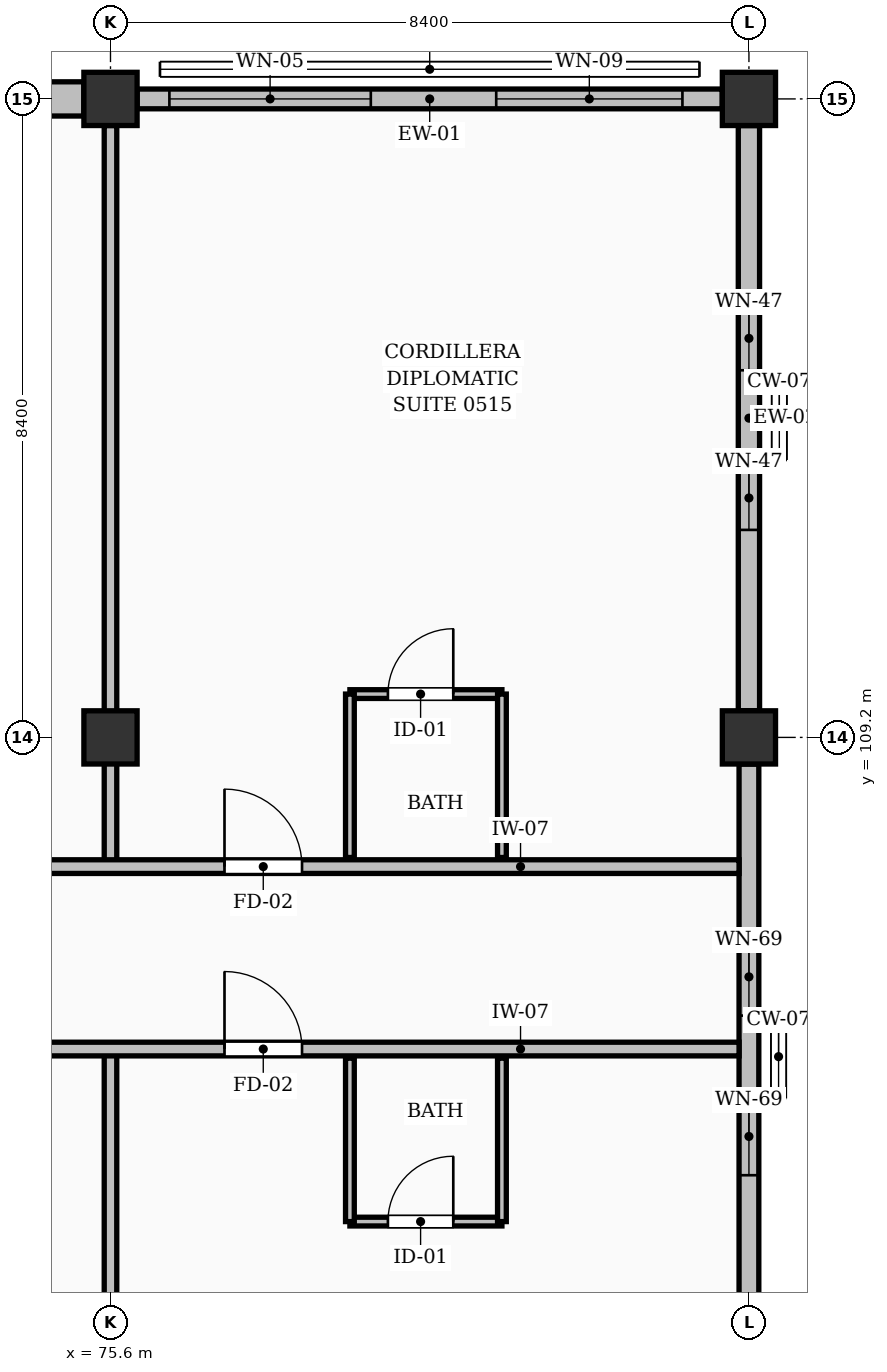
"""IFC4 building model, lengths in metres.
Left out: names, types, materials, properties, quantities, classifications, styles, units other than length and angle.
Written with IfcOpenShell. Run it as: python <this file> out.ifc"""

import sys

from ifc_helpers import new_model, si_unit, direction, frame, frame_2d, origin, origin_2d, place, context, subcontext, project, spatial, rectangle, extrude, element, fill, save


model = new_model("IFC4")
c1 = context("Model", 3, precision=1e-05, world=origin(), true_north=direction((0.0, 1.0)))
c2 = subcontext(c1, "Body", "Model", "MODEL_VIEW")
j1 = project(units=[si_unit("LENGTHUNIT", "METRE"), si_unit("PLANEANGLEUNIT", "RADIAN")], contexts=[c1])
p1 = place(None, origin())
s1 = spatial("IfcSite", under=j1, at=p1, CompositionType="ELEMENT")
p2 = place(p1, origin())
s2 = spatial("IfcBuilding", under=s1, at=p2, CompositionType="ELEMENT")
p3 = place(p2, frame((0.0, 0.0, 18.48)))
s3 = spatial("IfcBuildingStorey", under=s2, at=p3, CompositionType="ELEMENT", Elevation=18.48)
for number, where, z_axis, x_axis in (
    (1, (75.6, 109.2, 0.0), (0.0, 0.0, 1.0), (1.0, 0.0, 0.0)),
    (2, (75.6, 117.6, 0.0), (0.0, 0.0, 1.0), (1.0, 0.0, 0.0)),
    (3, (84.0, 109.2, 0.0), (0.0, 0.0, 1.0), (1.0, 0.0, 0.0)),
    (4, (84.0, 117.6, 0.0), (0.0, 0.0, 1.0), (1.0, 0.0, 0.0)),
):
    element("IfcColumn", number, at=place(p3, frame(where, z_axis=z_axis, x_axis=x_axis)), inside=s3, PredefinedType="COLUMN", context=c2, shape_type="SweptSolid", body=[
        extrude(rectangle(XDim=0.7, YDim=0.7, at=origin_2d()), origin(), (0.0, 0.0, 1.0), 3.36),
    ])
p4 = place(p3, frame((67.551, 117.6, 0.0), z_axis=(0.0, 0.0, 1.0), x_axis=(1.0, 0.0, 0.0)))
e5 = element("IfcWall", 5, at=p4, inside=s3, PredefinedType="SOLIDWALL", context=c2, shape_type="SweptSolid", body=[
    extrude(rectangle(XDim=7.698, YDim=0.45, at=frame_2d((3.849, 0.0))), origin(), (0.0, 0.0, 1.0), 2.414),
])
p5 = place(p4, frame((0.924, 0.0, 0.0)))
e6 = element("IfcOpeningElement", 6, at=p5, cuts=e5, PredefinedType="OPENING", context=c2, shape_type="SweptSolid", body=[
    extrude(rectangle(XDim=1.75, YDim=2.08, at=frame_2d((0.875, 1.04))), frame((0.0, 0.235, 0.0), z_axis=(0.0, -1.0, 0.0), x_axis=(1.0, 0.0, 0.0)), (0.0, 0.0, 1.0), 0.47),
])
p6 = place(p4, frame((4.689, 0.0, 0.25)))
e7 = element("IfcOpeningElement", 7, at=p6, cuts=e5, PredefinedType="OPENING", context=c2, shape_type="SweptSolid", body=[
    extrude(rectangle(XDim=2.22, YDim=1.9, at=frame_2d((1.11, 0.95))), frame((0.0, 0.235, 0.0), z_axis=(0.0, -1.0, 0.0), x_axis=(1.0, 0.0, 0.0)), (0.0, 0.0, 1.0), 0.47),
])
p7 = place(p3, frame((75.951, 117.6, 0.0), z_axis=(0.0, 0.0, 1.0), x_axis=(1.0, 0.0, 0.0)))
e8 = element("IfcWall", 8, at=p7, inside=s3, PredefinedType="SOLIDWALL", context=c2, shape_type="SweptSolid", body=[
    extrude(rectangle(XDim=7.698, YDim=0.26, at=frame_2d((3.849, 0.0))), origin(), (0.0, 0.0, 1.0), 2.414),
])
p8 = place(p7, frame((0.424, 0.0, 0.25)))
e9 = element("IfcOpeningElement", 9, at=p8, cuts=e8, PredefinedType="OPENING", context=c2, shape_type="SweptSolid", body=[
    extrude(rectangle(XDim=2.65, YDim=1.85, at=frame_2d((1.325, 0.925))), frame((0.0, 0.14, 0.0), z_axis=(0.0, -1.0, 0.0), x_axis=(1.0, 0.0, 0.0)), (0.0, 0.0, 1.0), 0.28),
])
p9 = place(p7, frame((4.724, 0.0, 0.25)))
e10 = element("IfcOpeningElement", 10, at=p9, cuts=e8, PredefinedType="OPENING", context=c2, shape_type="SweptSolid", body=[
    extrude(rectangle(XDim=2.45, YDim=1.95, at=frame_2d((1.225, 0.975))), frame((0.0, 0.14, 0.0), z_axis=(0.0, -1.0, 0.0), x_axis=(1.0, 0.0, 0.0)), (0.0, 0.0, 1.0), 0.28),
])
p10 = place(p3, frame((84.0, 101.151, 0.0), z_axis=(0.0, 0.0, 1.0), x_axis=(0.0, 1.0, 0.0)))
e11 = element("IfcWall", 11, at=p10, inside=s3, PredefinedType="SOLIDWALL", context=c2, shape_type="SweptSolid", body=[
    extrude(rectangle(XDim=7.698, YDim=0.26, at=frame_2d((3.849, 0.0))), origin(), (0.0, 0.0, 1.0), 2.414),
])
p11 = place(p10, frame((2.289, 0.0, 0.3)))
e12 = element("IfcOpeningElement", 12, at=p11, cuts=e11, PredefinedType="OPENING", context=c2, shape_type="SweptSolid", body=[
    extrude(rectangle(XDim=1.02, YDim=1.9, at=frame_2d((0.51, 0.95))), frame((0.0, 0.14, 0.0), z_axis=(0.0, -1.0, 0.0), x_axis=(1.0, 0.0, 0.0)), (0.0, 0.0, 1.0), 0.28),
])
p12 = place(p10, frame((4.389, 0.0, 0.3)))
e13 = element("IfcOpeningElement", 13, at=p12, cuts=e11, PredefinedType="OPENING", context=c2, shape_type="SweptSolid", body=[
    extrude(rectangle(XDim=1.02, YDim=1.9, at=frame_2d((0.51, 0.95))), frame((0.0, 0.14, 0.0), z_axis=(0.0, -1.0, 0.0), x_axis=(1.0, 0.0, 0.0)), (0.0, 0.0, 1.0), 0.28),
])
p13 = place(p3, frame((84.0, 109.551, 0.0), z_axis=(0.0, 0.0, 1.0), x_axis=(0.0, 1.0, 0.0)))
e14 = element("IfcWall", 14, at=p13, inside=s3, PredefinedType="SOLIDWALL", context=c2, shape_type="SweptSolid", body=[
    extrude(rectangle(XDim=7.698, YDim=0.28, at=frame_2d((3.849, 0.0))), origin(), (0.0, 0.0, 1.0), 2.414),
])
p14 = place(p13, frame((2.379, 0.0, 0.3)))
e15 = element("IfcOpeningElement", 15, at=p14, cuts=e14, PredefinedType="OPENING", context=c2, shape_type="SweptSolid", body=[
    extrude(rectangle(XDim=0.84, YDim=1.85, at=frame_2d((0.42, 0.925))), frame((0.0, 0.15, 0.0), z_axis=(0.0, -1.0, 0.0), x_axis=(1.0, 0.0, 0.0)), (0.0, 0.0, 1.0), 0.3),
])
p15 = place(p13, frame((4.479, 0.0, 0.3)))
e16 = element("IfcOpeningElement", 16, at=p15, cuts=e14, PredefinedType="OPENING", context=c2, shape_type="SweptSolid", body=[
    extrude(rectangle(XDim=0.84, YDim=1.85, at=frame_2d((0.42, 0.925))), frame((0.0, 0.15, 0.0), z_axis=(0.0, -1.0, 0.0), x_axis=(1.0, 0.0, 0.0)), (0.0, 0.0, 1.0), 0.3),
])
p16 = place(p3, frame((78.75, 109.77, 0.0), z_axis=(0.0, 0.0, 1.0), x_axis=(1.0, 0.0, 0.0)))
e17 = element("IfcWall", 17, at=p16, inside=s3, PredefinedType="PARTITIONING", context=c2, shape_type="SweptSolid", body=[
    extrude(rectangle(XDim=2.0, YDim=0.115, at=frame_2d((1.0, 0.0))), origin(), (0.0, 0.0, 1.0), 3.12),
])
p17 = place(p16, frame((0.5, 0.0, 0.0)))
e18 = element("IfcOpeningElement", 18, at=p17, cuts=e17, PredefinedType="OPENING", context=c2, shape_type="SweptSolid", body=[
    extrude(rectangle(XDim=0.86, YDim=2.05, at=frame_2d((0.43, 1.025))), frame((0.0, 0.067, 0.0), z_axis=(0.0, -1.0, 0.0), x_axis=(1.0, 0.0, 0.0)), (0.0, 0.0, 1.0), 0.135),
])
for number, where, z_axis, x_axis in (
    (19, (78.75, 107.62, 0.0), (0.0, 0.0, 1.0), (0.0, 1.0, 0.0)),
    (20, (80.75, 107.62, 0.0), (0.0, 0.0, 1.0), (0.0, 1.0, 0.0)),
):
    element("IfcWall", number, at=place(p3, frame(where, z_axis=z_axis, x_axis=x_axis)), inside=s3, PredefinedType="PARTITIONING", context=c2, shape_type="SweptSolid", body=[
        extrude(rectangle(XDim=2.15, YDim=0.115, at=frame_2d((1.075, 0.0))), origin(), (0.0, 0.0, 1.0), 3.12),
    ])
p18 = place(p3, frame((75.6, 107.5, 0.0), z_axis=(0.0, 0.0, 1.0), x_axis=(0.0, 1.0, 0.0)))
e21 = element("IfcWall", 21, at=p18, inside=s3, PredefinedType="PARTITIONING", context=c2, shape_type="SweptSolid", body=[
    extrude(rectangle(XDim=9.75, YDim=0.165, at=frame_2d((4.875, 0.0))), origin(), (0.0, 0.0, 1.0), 2.375),
])
p19 = place(p3, frame((40.66, 107.5, 0.0), z_axis=(0.0, 0.0, 1.0), x_axis=(1.0, 0.0, 0.0)))
e22 = element("IfcWall", 22, at=p19, inside=s3, PredefinedType="PARTITIONING", context=c2, shape_type="SweptSolid", body=[
    extrude(rectangle(XDim=43.21, YDim=0.18, at=frame_2d((21.605, 0.0))), origin(), (0.0, 0.0, 1.0), 3.12),
])
p20 = place(p19, frame((0.2, 0.0, 0.0)))
e23 = element("IfcOpeningElement", 23, at=p20, cuts=e22, PredefinedType="OPENING", context=c2, shape_type="SweptSolid", body=[
    extrude(rectangle(XDim=0.94, YDim=2.1, at=frame_2d((0.47, 1.05))), frame((0.0, 0.1, 0.0), z_axis=(0.0, -1.0, 0.0), x_axis=(1.0, 0.0, 0.0)), (0.0, 0.0, 1.0), 0.2),
])
p21 = place(p19, frame((2.71, 0.0, 0.0)))
e24 = element("IfcOpeningElement", 24, at=p21, cuts=e22, PredefinedType="OPENING", context=c2, shape_type="SweptSolid", body=[
    extrude(rectangle(XDim=0.96, YDim=2.15, at=frame_2d((0.48, 1.075))), frame((0.0, 0.1, 0.0), z_axis=(0.0, -1.0, 0.0), x_axis=(1.0, 0.0, 0.0)), (0.0, 0.0, 1.0), 0.2),
])
p22 = place(p19, frame((7.37, 0.0, 0.0)))
e25 = element("IfcOpeningElement", 25, at=p22, cuts=e22, PredefinedType="OPENING", context=c2, shape_type="SweptSolid", body=[
    extrude(rectangle(XDim=0.96, YDim=2.15, at=frame_2d((0.48, 1.075))), frame((0.0, 0.1, 0.0), z_axis=(0.0, -1.0, 0.0), x_axis=(1.0, 0.0, 0.0)), (0.0, 0.0, 1.0), 0.2),
])
p23 = place(p19, frame((11.11, 0.0, 0.0)))
e26 = element("IfcOpeningElement", 26, at=p23, cuts=e22, PredefinedType="OPENING", context=c2, shape_type="SweptSolid", body=[
    extrude(rectangle(XDim=0.96, YDim=2.15, at=frame_2d((0.48, 1.075))), frame((0.0, 0.1, 0.0), z_axis=(0.0, -1.0, 0.0), x_axis=(1.0, 0.0, 0.0)), (0.0, 0.0, 1.0), 0.2),
])
p24 = place(p19, frame((15.77, 0.0, 0.0)))
e27 = element("IfcOpeningElement", 27, at=p24, cuts=e22, PredefinedType="OPENING", context=c2, shape_type="SweptSolid", body=[
    extrude(rectangle(XDim=0.96, YDim=2.15, at=frame_2d((0.48, 1.075))), frame((0.0, 0.1, 0.0), z_axis=(0.0, -1.0, 0.0), x_axis=(1.0, 0.0, 0.0)), (0.0, 0.0, 1.0), 0.2),
])
p25 = place(p19, frame((19.51, 0.0, 0.0)))
e28 = element("IfcOpeningElement", 28, at=p25, cuts=e22, PredefinedType="OPENING", context=c2, shape_type="SweptSolid", body=[
    extrude(rectangle(XDim=0.96, YDim=2.15, at=frame_2d((0.48, 1.075))), frame((0.0, 0.1, 0.0), z_axis=(0.0, -1.0, 0.0), x_axis=(1.0, 0.0, 0.0)), (0.0, 0.0, 1.0), 0.2),
])
p26 = place(p19, frame((24.17, 0.0, 0.0)))
e29 = element("IfcOpeningElement", 29, at=p26, cuts=e22, PredefinedType="OPENING", context=c2, shape_type="SweptSolid", body=[
    extrude(rectangle(XDim=0.96, YDim=2.15, at=frame_2d((0.48, 1.075))), frame((0.0, 0.1, 0.0), z_axis=(0.0, -1.0, 0.0), x_axis=(1.0, 0.0, 0.0)), (0.0, 0.0, 1.0), 0.2),
])
p27 = place(p19, frame((27.91, 0.0, 0.0)))
e30 = element("IfcOpeningElement", 30, at=p27, cuts=e22, PredefinedType="OPENING", context=c2, shape_type="SweptSolid", body=[
    extrude(rectangle(XDim=0.96, YDim=2.15, at=frame_2d((0.48, 1.075))), frame((0.0, 0.1, 0.0), z_axis=(0.0, -1.0, 0.0), x_axis=(1.0, 0.0, 0.0)), (0.0, 0.0, 1.0), 0.2),
])
p28 = place(p19, frame((32.57, 0.0, 0.0)))
e31 = element("IfcOpeningElement", 31, at=p28, cuts=e22, PredefinedType="OPENING", context=c2, shape_type="SweptSolid", body=[
    extrude(rectangle(XDim=0.96, YDim=2.15, at=frame_2d((0.48, 1.075))), frame((0.0, 0.1, 0.0), z_axis=(0.0, -1.0, 0.0), x_axis=(1.0, 0.0, 0.0)), (0.0, 0.0, 1.0), 0.2),
])
p29 = place(p19, frame((36.44, 0.0, 0.0)))
e32 = element("IfcOpeningElement", 32, at=p29, cuts=e22, PredefinedType="OPENING", context=c2, shape_type="SweptSolid", body=[
    extrude(rectangle(XDim=1.02, YDim=2.15, at=frame_2d((0.51, 1.075))), frame((0.0, 0.1, 0.0), z_axis=(0.0, -1.0, 0.0), x_axis=(1.0, 0.0, 0.0)), (0.0, 0.0, 1.0), 0.2),
])
p30 = place(p3, frame((78.75, 102.83, 0.0), z_axis=(0.0, 0.0, 1.0), x_axis=(1.0, 0.0, 0.0)))
e33 = element("IfcWall", 33, at=p30, inside=s3, PredefinedType="PARTITIONING", context=c2, shape_type="SweptSolid", body=[
    extrude(rectangle(XDim=2.0, YDim=0.115, at=frame_2d((1.0, 0.0))), origin(), (0.0, 0.0, 1.0), 3.12),
])
p31 = place(p30, frame((0.5, 0.0, 0.0)))
e34 = element("IfcOpeningElement", 34, at=p31, cuts=e33, PredefinedType="OPENING", context=c2, shape_type="SweptSolid", body=[
    extrude(rectangle(XDim=0.86, YDim=2.05, at=frame_2d((0.43, 1.025))), frame((0.0, 0.067, 0.0), z_axis=(0.0, -1.0, 0.0), x_axis=(1.0, 0.0, 0.0)), (0.0, 0.0, 1.0), 0.135),
])
for number, where, z_axis, x_axis in (
    (35, (78.75, 102.83, 0.0), (0.0, 0.0, 1.0), (0.0, 1.0, 0.0)),
    (36, (80.75, 102.83, 0.0), (0.0, 0.0, 1.0), (0.0, 1.0, 0.0)),
):
    element("IfcWall", number, at=place(p3, frame(where, z_axis=z_axis, x_axis=x_axis)), inside=s3, PredefinedType="PARTITIONING", context=c2, shape_type="SweptSolid", body=[
        extrude(rectangle(XDim=2.15, YDim=0.115, at=frame_2d((1.075, 0.0))), origin(), (0.0, 0.0, 1.0), 3.12),
    ])
p32 = place(p3, frame((75.6, 92.75, 0.0), z_axis=(0.0, 0.0, 1.0), x_axis=(0.0, 1.0, 0.0)))
e37 = element("IfcWall", 37, at=p32, inside=s3, PredefinedType="PARTITIONING", context=c2, shape_type="SweptSolid", body=[
    extrude(rectangle(XDim=12.35, YDim=0.165, at=frame_2d((6.175, 0.0))), origin(), (0.0, 0.0, 1.0), 2.375),
])
p33 = place(p3, frame((54.4, 105.1, 0.0), z_axis=(0.0, 0.0, 1.0), x_axis=(1.0, 0.0, 0.0)))
e38 = element("IfcWall", 38, at=p33, inside=s3, PredefinedType="PARTITIONING", context=c2, shape_type="SweptSolid", body=[
    extrude(rectangle(XDim=29.47, YDim=0.18, at=frame_2d((14.735, 0.0))), origin(), (0.0, 0.0, 1.0), 3.12),
])
p34 = place(p33, frame((2.03, 0.0, 0.0)))
e39 = element("IfcOpeningElement", 39, at=p34, cuts=e38, PredefinedType="OPENING", context=c2, shape_type="SweptSolid", body=[
    extrude(rectangle(XDim=0.96, YDim=2.15, at=frame_2d((0.48, 1.075))), frame((0.0, 0.1, 0.0), z_axis=(0.0, -1.0, 0.0), x_axis=(1.0, 0.0, 0.0)), (0.0, 0.0, 1.0), 0.2),
])
p35 = place(p33, frame((5.77, 0.0, 0.0)))
e40 = element("IfcOpeningElement", 40, at=p35, cuts=e38, PredefinedType="OPENING", context=c2, shape_type="SweptSolid", body=[
    extrude(rectangle(XDim=0.96, YDim=2.15, at=frame_2d((0.48, 1.075))), frame((0.0, 0.1, 0.0), z_axis=(0.0, -1.0, 0.0), x_axis=(1.0, 0.0, 0.0)), (0.0, 0.0, 1.0), 0.2),
])
p36 = place(p33, frame((10.43, 0.0, 0.0)))
e41 = element("IfcOpeningElement", 41, at=p36, cuts=e38, PredefinedType="OPENING", context=c2, shape_type="SweptSolid", body=[
    extrude(rectangle(XDim=0.96, YDim=2.15, at=frame_2d((0.48, 1.075))), frame((0.0, 0.1, 0.0), z_axis=(0.0, -1.0, 0.0), x_axis=(1.0, 0.0, 0.0)), (0.0, 0.0, 1.0), 0.2),
])
p37 = place(p33, frame((14.17, 0.0, 0.0)))
e42 = element("IfcOpeningElement", 42, at=p37, cuts=e38, PredefinedType="OPENING", context=c2, shape_type="SweptSolid", body=[
    extrude(rectangle(XDim=0.96, YDim=2.15, at=frame_2d((0.48, 1.075))), frame((0.0, 0.1, 0.0), z_axis=(0.0, -1.0, 0.0), x_axis=(1.0, 0.0, 0.0)), (0.0, 0.0, 1.0), 0.2),
])
p38 = place(p33, frame((18.83, 0.0, 0.0)))
e43 = element("IfcOpeningElement", 43, at=p38, cuts=e38, PredefinedType="OPENING", context=c2, shape_type="SweptSolid", body=[
    extrude(rectangle(XDim=0.96, YDim=2.15, at=frame_2d((0.48, 1.075))), frame((0.0, 0.1, 0.0), z_axis=(0.0, -1.0, 0.0), x_axis=(1.0, 0.0, 0.0)), (0.0, 0.0, 1.0), 0.2),
])
p39 = place(p33, frame((22.7, 0.0, 0.0)))
e44 = element("IfcOpeningElement", 44, at=p39, cuts=e38, PredefinedType="OPENING", context=c2, shape_type="SweptSolid", body=[
    extrude(rectangle(XDim=1.02, YDim=2.15, at=frame_2d((0.51, 1.075))), frame((0.0, 0.1, 0.0), z_axis=(0.0, -1.0, 0.0), x_axis=(1.0, 0.0, 0.0)), (0.0, 0.0, 1.0), 0.2),
])
p40 = place(p8, origin())
e45 = element("IfcWindow", 45, at=p40, inside=s3, PartitioningType="DOUBLE_PANEL_VERTICAL", PredefinedType="WINDOW", context=c2, shape_type="SweptSolid", body=[
    extrude(rectangle(XDim=2.65, YDim=1.85, at=frame_2d((1.325, 0.925))), frame((0.0, 0.03, 0.0), z_axis=(0.0, -1.0, 0.0), x_axis=(1.0, 0.0, 0.0)), (0.0, 0.0, 1.0), 0.06),
])
fill(e9, e45)
p41 = place(p9, origin())
e46 = element("IfcWindow", 46, at=p41, inside=s3, PartitioningType="DOUBLE_PANEL_VERTICAL", PredefinedType="WINDOW", context=c2, shape_type="SweptSolid", body=[
    extrude(rectangle(XDim=2.45, YDim=1.95, at=frame_2d((1.225, 0.975))), frame((0.0, 0.03, 0.0), z_axis=(0.0, -1.0, 0.0), x_axis=(1.0, 0.0, 0.0)), (0.0, 0.0, 1.0), 0.06),
])
fill(e10, e46)
p42 = place(p11, origin())
e47 = element("IfcWindow", 47, at=p42, inside=s3, PartitioningType="SINGLE_PANEL", PredefinedType="WINDOW", context=c2, shape_type="SweptSolid", body=[
    extrude(rectangle(XDim=1.02, YDim=1.9, at=frame_2d((0.51, 0.95))), frame((0.0, 0.03, 0.0), z_axis=(0.0, -1.0, 0.0), x_axis=(1.0, 0.0, 0.0)), (0.0, 0.0, 1.0), 0.06),
])
fill(e12, e47)
p43 = place(p12, origin())
e48 = element("IfcWindow", 48, at=p43, inside=s3, PartitioningType="SINGLE_PANEL", PredefinedType="WINDOW", context=c2, shape_type="SweptSolid", body=[
    extrude(rectangle(XDim=1.02, YDim=1.9, at=frame_2d((0.51, 0.95))), frame((0.0, 0.03, 0.0), z_axis=(0.0, -1.0, 0.0), x_axis=(1.0, 0.0, 0.0)), (0.0, 0.0, 1.0), 0.06),
])
fill(e13, e48)
p44 = place(p14, origin())
e49 = element("IfcWindow", 49, at=p44, inside=s3, PartitioningType="SINGLE_PANEL", PredefinedType="WINDOW", context=c2, shape_type="SweptSolid", body=[
    extrude(rectangle(XDim=0.84, YDim=1.85, at=frame_2d((0.42, 0.925))), frame((0.0, 0.03, 0.0), z_axis=(0.0, -1.0, 0.0), x_axis=(1.0, 0.0, 0.0)), (0.0, 0.0, 1.0), 0.06),
])
fill(e15, e49)
p45 = place(p15, origin())
e50 = element("IfcWindow", 50, at=p45, inside=s3, PartitioningType="SINGLE_PANEL", PredefinedType="WINDOW", context=c2, shape_type="SweptSolid", body=[
    extrude(rectangle(XDim=0.84, YDim=1.85, at=frame_2d((0.42, 0.925))), frame((0.0, 0.03, 0.0), z_axis=(0.0, -1.0, 0.0), x_axis=(1.0, 0.0, 0.0)), (0.0, 0.0, 1.0), 0.06),
])
fill(e16, e50)
p46 = place(p17, origin())
e51 = element("IfcDoor", 51, at=p46, inside=s3, OperationType="SINGLE_SWING_RIGHT", PredefinedType="DOOR", context=c2, shape_type="SweptSolid", body=[
    extrude(rectangle(XDim=0.86, YDim=2.05, at=frame_2d((0.43, 1.025))), frame((0.0, 0.025, 0.0), z_axis=(0.0, -1.0, 0.0), x_axis=(1.0, 0.0, 0.0)), (0.0, 0.0, 1.0), 0.05),
])
fill(e18, e51)
p47 = place(p29, origin())
e52 = element("IfcDoor", 52, at=p47, inside=s3, OperationType="SINGLE_SWING_LEFT", PredefinedType="DOOR", context=c2, shape_type="SweptSolid", body=[
    extrude(rectangle(XDim=1.02, YDim=2.15, at=frame_2d((0.51, 1.075))), frame((0.0, 0.025, 0.0), z_axis=(0.0, -1.0, 0.0), x_axis=(1.0, 0.0, 0.0)), (0.0, 0.0, 1.0), 0.05),
])
fill(e32, e52)
p48 = place(p31, origin())
e53 = element("IfcDoor", 53, at=p48, inside=s3, OperationType="SINGLE_SWING_RIGHT", PredefinedType="DOOR", context=c2, shape_type="SweptSolid", body=[
    extrude(rectangle(XDim=0.86, YDim=2.05, at=frame_2d((0.43, 1.025))), frame((0.0, 0.025, 0.0), z_axis=(0.0, -1.0, 0.0), x_axis=(1.0, 0.0, 0.0)), (0.0, 0.0, 1.0), 0.05),
])
fill(e34, e53)
p49 = place(p39, origin())
e54 = element("IfcDoor", 54, at=p49, inside=s3, OperationType="SINGLE_SWING_LEFT", PredefinedType="DOOR", context=c2, shape_type="SweptSolid", body=[
    extrude(rectangle(XDim=1.02, YDim=2.15, at=frame_2d((0.51, 1.075))), frame((0.0, 0.025, 0.0), z_axis=(0.0, -1.0, 0.0), x_axis=(1.0, 0.0, 0.0)), (0.0, 0.0, 1.0), 0.05),
])
fill(e44, e54)
save(model, sys.argv[1])
